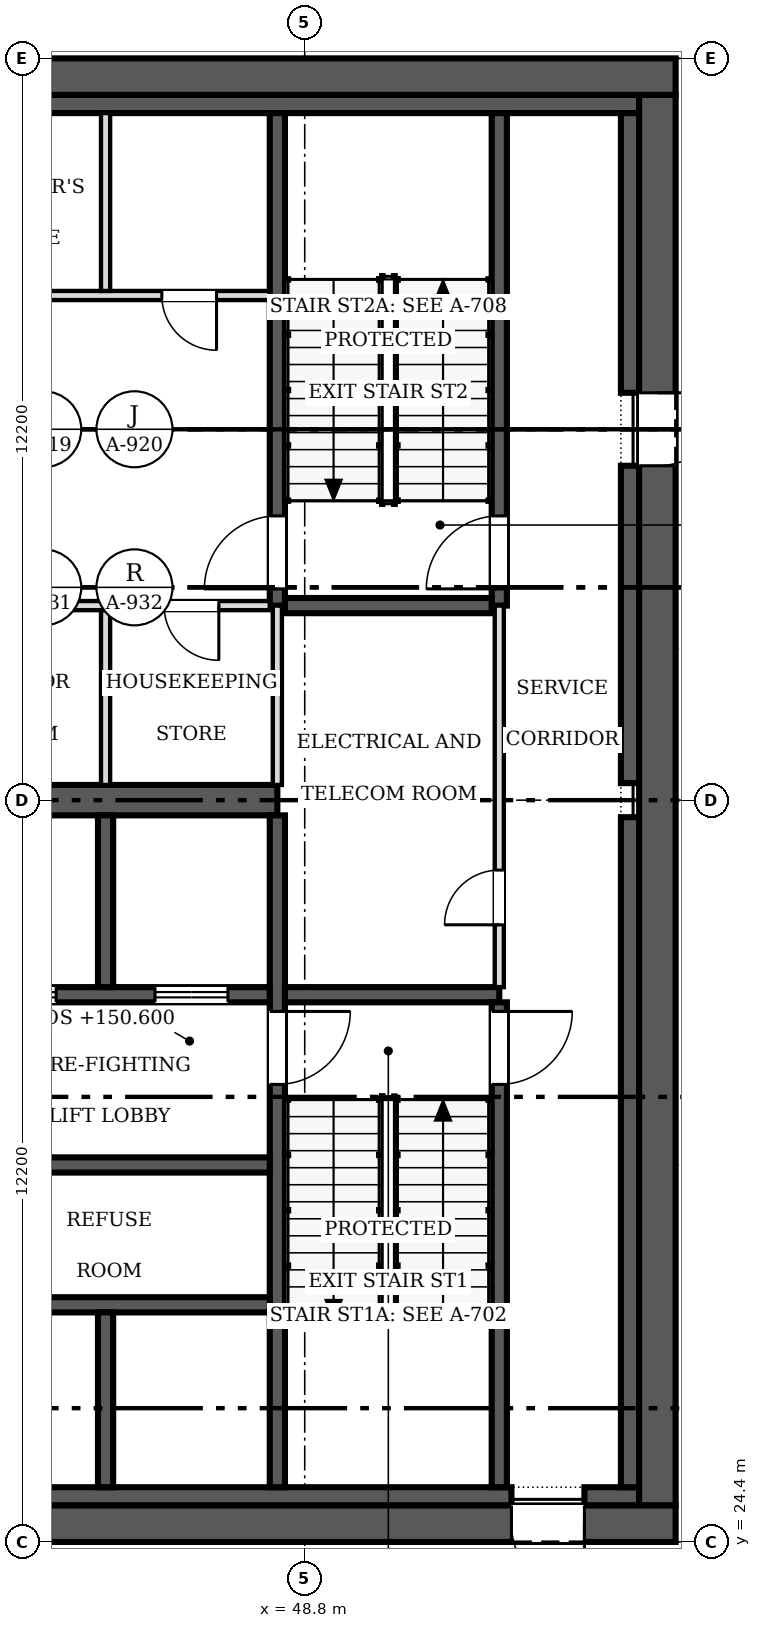
"""IFC4 building model, lengths in metres.
Left out: names, types, materials, properties, quantities, classifications, styles, units other than length and angle.
Written with IfcOpenShell. Run it as: python <this file> out.ifc"""

import sys

from ifc_helpers import new_model, si_unit, direction, frame, frame_2d, origin, place, context, subcontext, project, spatial, rectangle, extrude, source, transform, mapped, element, fill, save


model = new_model("IFC4")
c1 = context("Model", 3, precision=1e-05, world=origin(), true_north=direction((0.0, 1.0)))
c2 = subcontext(c1, "Body", "Model", "MODEL_VIEW")
j1 = project(units=[si_unit("LENGTHUNIT", "METRE"), si_unit("PLANEANGLEUNIT", "RADIAN")], contexts=[c1])
p1 = place(None, origin())
s1 = spatial("IfcSite", under=j1, at=p1, CompositionType="ELEMENT")
p2 = place(p1, origin())
s2 = spatial("IfcBuilding", under=s1, at=p2, CompositionType="ELEMENT")
p3 = place(p2, frame((0.0, 0.0, 150.6)))
s3 = spatial("IfcBuildingStorey", under=s2, at=p3, CompositionType="ELEMENT", Elevation=150.6)
p4 = place(p3, frame((54.9, 24.7, 0.0), z_axis=(0.0, 0.0, 1.0), x_axis=(-1.0, 0.0, 0.0)))
e1 = element("IfcWall", 1, at=p4, inside=s3, PredefinedType="SHEAR", context=c2, shape_type="SweptSolid", body=[
    extrude(rectangle(XDim=24.4, YDim=0.6, at=frame_2d((12.2, 0.0))), origin(), (0.0, 0.0, 1.0), 4.8),
])
m1 = source(origin(), c2, "Body", "SweptSolid", [
    extrude(rectangle(XDim=1.2, YDim=2.1, at=frame_2d((0.6, 1.05))), frame((0.0, 0.31, 0.0), z_axis=(0.0, -1.0, 0.0), x_axis=(1.0, 0.0, 0.0)), (0.0, 0.0, 1.0), 0.62),
])
p5 = place(p4, frame((1.5, 0.0, 0.0)))
e2 = element("IfcOpeningElement", 2, at=p5, cuts=e1, PredefinedType="OPENING", context=c2, shape_type="MappedRepresentation", body=[
    mapped(m1, transform((0.0, 0.0, 0.0), scale=1.0)),
])
p6 = place(p3, frame((30.5, 48.5, 0.0), z_axis=(0.0, 0.0, 1.0), x_axis=(1.0, 0.0, 0.0)))
e3 = element("IfcWall", 3, at=p6, inside=s3, PredefinedType="SHEAR", context=c2, shape_type="SweptSolid", body=[
    extrude(rectangle(XDim=24.4, YDim=0.6, at=frame_2d((12.2, 0.0))), origin(), (0.0, 0.0, 1.0), 4.8),
])
p7 = place(p3, frame((54.6, 48.2, 0.0), z_axis=(0.0, 0.0, 1.0), x_axis=(0.0, -1.0, 0.0)))
e4 = element("IfcWall", 4, at=p7, inside=s3, PredefinedType="SHEAR", context=c2, shape_type="SweptSolid", body=[
    extrude(rectangle(XDim=23.2, YDim=0.6, at=frame_2d((11.6, 0.0))), origin(), (0.0, 0.0, 1.0), 4.8),
])
p8 = place(p7, frame((4.9, 0.0, 0.0)))
e5 = element("IfcOpeningElement", 5, at=p8, cuts=e4, PredefinedType="OPENING", context=c2, shape_type="MappedRepresentation", body=[
    mapped(m1, transform((0.0, 0.0, 0.0), scale=1.0)),
])
p9 = place(p3, frame((31.1, 25.15, 0.0), z_axis=(0.0, 0.0, 1.0), x_axis=(1.0, 0.0, 0.0)))
e6 = element("IfcWall", 6, at=p9, inside=s3, PredefinedType="SOLIDWALL", context=c2, shape_type="SweptSolid", body=[
    extrude(rectangle(XDim=21.1, YDim=0.3, at=frame_2d((10.55, 0.0))), origin(), (0.0, 0.0, 1.0), 4.8),
])
p10 = place(p3, frame((53.4, 25.15, 0.0), z_axis=(0.0, 0.0, 1.0), x_axis=(1.0, 0.0, 0.0)))
e7 = element("IfcWall", 7, at=p10, inside=s3, PredefinedType="SOLIDWALL", context=c2, shape_type="SweptSolid", body=[
    extrude(rectangle(XDim=0.9, YDim=0.3, at=frame_2d((0.45, 0.0))), origin(), (0.0, 0.0, 1.0), 4.8),
])
p11 = place(p3, frame((31.1, 48.05, 0.0), z_axis=(0.0, 0.0, 1.0), x_axis=(1.0, 0.0, 0.0)))
e8 = element("IfcWall", 8, at=p11, inside=s3, PredefinedType="SOLIDWALL", context=c2, shape_type="SweptSolid", body=[
    extrude(rectangle(XDim=23.2, YDim=0.3, at=frame_2d((11.6, 0.0))), origin(), (0.0, 0.0, 1.0), 4.8),
])
p12 = place(p3, frame((54.15, 25.3, 0.0), z_axis=(0.0, 0.0, 1.0), x_axis=(0.0, 1.0, 0.0)))
e9 = element("IfcWall", 9, at=p12, inside=s3, PredefinedType="SOLIDWALL", context=c2, shape_type="SweptSolid", body=[
    extrude(rectangle(XDim=11.02, YDim=0.3, at=frame_2d((5.51, 0.0))), origin(), (0.0, 0.0, 1.0), 4.8),
])
p13 = place(p3, frame((54.15, 36.88, 0.0), z_axis=(0.0, 0.0, 1.0), x_axis=(0.0, 1.0, 0.0)))
e10 = element("IfcWall", 10, at=p13, inside=s3, PredefinedType="SOLIDWALL", context=c2, shape_type="SweptSolid", body=[
    extrude(rectangle(XDim=5.22, YDim=0.3, at=frame_2d((2.61, 0.0))), origin(), (0.0, 0.0, 1.0), 4.8),
])
p14 = place(p3, frame((54.15, 43.3, 0.0), z_axis=(0.0, 0.0, 1.0), x_axis=(0.0, 1.0, 0.0)))
e11 = element("IfcWall", 11, at=p14, inside=s3, PredefinedType="SOLIDWALL", context=c2, shape_type="SweptSolid", body=[
    extrude(rectangle(XDim=4.6, YDim=0.3, at=frame_2d((2.3, 0.0))), origin(), (0.0, 0.0, 1.0), 4.8),
])
p15 = place(p3, frame((31.4, 36.6, 0.0), z_axis=(0.0, 0.0, 1.0), x_axis=(1.0, 0.0, 0.0)))
e12 = element("IfcWall", 12, at=p15, inside=s3, PredefinedType="SHEAR", context=c2, shape_type="SweptSolid", body=[
    extrude(rectangle(XDim=16.95, YDim=0.5, at=frame_2d((8.475, 0.0))), origin(), (0.0, 0.0, 1.0), 4.8),
])
p16 = place(p3, frame((48.35, 36.35, 0.0), z_axis=(0.0, 0.0, 1.0), x_axis=(0.0, -1.0, 0.0)))
e13 = element("IfcWall", 13, at=p16, inside=s3, PredefinedType="SOLIDWALL", context=c2, shape_type="SweptSolid", body=[
    extrude(rectangle(XDim=11.05, YDim=0.25, at=frame_2d((5.525, 0.0))), origin(), (0.0, 0.0, 1.0), 4.8),
])
m2 = source(origin(), c2, "Body", "SweptSolid", [
    extrude(rectangle(XDim=1.2, YDim=2.1, at=frame_2d((0.6, 1.05))), frame((0.0, 0.135, 0.0), z_axis=(0.0, -1.0, 0.0), x_axis=(1.0, 0.0, 0.0)), (0.0, 0.0, 1.0), 0.27),
])
p17 = place(p16, frame((3.225, 0.0, 0.0)))
e14 = element("IfcOpeningElement", 14, at=p17, cuts=e13, PredefinedType="OPENING", context=c2, shape_type="MappedRepresentation", body=[
    mapped(m2, transform((0.0, 0.0, 0.0), scale=1.0)),
])
p18 = place(p3, frame((48.225, 33.4, 0.0), z_axis=(0.0, 0.0, 1.0), x_axis=(-1.0, 0.0, 0.0)))
e15 = element("IfcWall", 15, at=p18, inside=s3, PredefinedType="SOLIDWALL", context=c2, shape_type="SweptSolid", body=[
    extrude(rectangle(XDim=5.275, YDim=0.25, at=frame_2d((2.638, 0.0))), origin(), (0.0, 0.0, 1.0), 4.8),
])
p19 = place(p18, frame((3.512, 0.0, 0.0)))
e16 = element("IfcOpeningElement", 16, at=p19, cuts=e15, PredefinedType="OPENING", context=c2, shape_type="MappedRepresentation", body=[
    mapped(m2, transform((0.0, 0.0, 0.0), scale=1.0)),
])
p20 = place(p18, frame((0.688, 0.0, 0.0)))
e17 = element("IfcOpeningElement", 17, at=p20, cuts=e15, PredefinedType="OPENING", context=c2, shape_type="MappedRepresentation", body=[
    mapped(m2, transform((0.0, 0.0, 0.0), scale=1.0)),
])
p21 = place(p3, frame((48.475, 33.4, 0.0), z_axis=(0.0, 0.0, 1.0), x_axis=(1.0, 0.0, 0.0)))
e18 = element("IfcWall", 18, at=p21, inside=s3, PredefinedType="SOLIDWALL", context=c2, shape_type="SweptSolid", body=[
    extrude(rectangle(XDim=3.525, YDim=0.25, at=frame_2d((1.762, 0.0))), origin(), (0.0, 0.0, 1.0), 4.8),
])
p22 = place(p3, frame((48.35, 47.9, 0.0), z_axis=(0.0, 0.0, 1.0), x_axis=(0.0, -1.0, 0.0)))
e19 = element("IfcWall", 19, at=p22, inside=s3, PredefinedType="SOLIDWALL", context=c2, shape_type="SweptSolid", body=[
    extrude(rectangle(XDim=8.1, YDim=0.25, at=frame_2d((4.05, 0.0))), origin(), (0.0, 0.0, 1.0), 4.8),
])
p23 = place(p22, frame((6.625, 0.0, 0.0)))
e20 = element("IfcOpeningElement", 20, at=p23, cuts=e19, PredefinedType="OPENING", context=c2, shape_type="MappedRepresentation", body=[
    mapped(m2, transform((0.0, 0.0, 0.0), scale=1.0)),
])
p24 = place(p3, frame((52.0, 25.3, 0.0), z_axis=(0.0, 0.0, 1.0), x_axis=(0.0, 1.0, 0.0)))
e21 = element("IfcWall", 21, at=p24, inside=s3, PredefinedType="SOLIDWALL", context=c2, shape_type="SweptSolid", body=[
    extrude(rectangle(XDim=7.975, YDim=0.25, at=frame_2d((3.987, 0.0))), origin(), (0.0, 0.0, 1.0), 4.8),
])
p25 = place(p24, frame((6.625, 0.0, 0.0)))
e22 = element("IfcOpeningElement", 22, at=p25, cuts=e21, PredefinedType="OPENING", context=c2, shape_type="MappedRepresentation", body=[
    mapped(m2, transform((0.0, 0.0, 0.0), scale=1.0)),
])
p26 = place(p3, frame((52.0, 39.8, 0.0), z_axis=(0.0, 0.0, 1.0), x_axis=(0.0, 1.0, 0.0)))
e23 = element("IfcWall", 23, at=p26, inside=s3, PredefinedType="SOLIDWALL", context=c2, shape_type="SweptSolid", body=[
    extrude(rectangle(XDim=8.1, YDim=0.25, at=frame_2d((4.05, 0.0))), origin(), (0.0, 0.0, 1.0), 4.8),
])
p27 = place(p26, frame((0.275, 0.0, 0.0)))
e24 = element("IfcOpeningElement", 24, at=p27, cuts=e23, PredefinedType="OPENING", context=c2, shape_type="MappedRepresentation", body=[
    mapped(m2, transform((0.0, 0.0, 0.0), scale=1.0)),
])
for number, where, z_axis, x_axis in (
    (25, (42.95, 28.3, 0.0), (0.0, 0.0, 1.0), (1.0, 0.0, 0.0)),
    (26, (42.95, 30.6, 0.0), (0.0, 0.0, 1.0), (1.0, 0.0, 0.0)),
):
    element("IfcWall", number, at=place(p3, frame(where, z_axis=z_axis, x_axis=x_axis)), inside=s3, PredefinedType="SOLIDWALL", context=c2, shape_type="SweptSolid", body=[
        extrude(rectangle(XDim=5.275, YDim=0.25, at=frame_2d((2.638, 0.0))), origin(), (0.0, 0.0, 1.0), 4.8),
    ])
p28 = place(p3, frame((48.475, 39.8, 0.0), z_axis=(0.0, 0.0, 1.0), x_axis=(1.0, 0.0, 0.0)))
e27 = element("IfcWall", 27, at=p28, inside=s3, PredefinedType="SOLIDWALL", context=c2, shape_type="SweptSolid", body=[
    extrude(rectangle(XDim=3.4, YDim=0.25, at=frame_2d((1.7, 0.0))), origin(), (0.0, 0.0, 1.0), 4.8),
])
p29 = place(p3, frame((45.525, 33.525, 0.0), z_axis=(0.0, 0.0, 1.0), x_axis=(0.0, 1.0, 0.0)))
e28 = element("IfcWall", 28, at=p29, inside=s3, PredefinedType="SOLIDWALL", context=c2, shape_type="SweptSolid", body=[
    extrude(rectangle(XDim=2.825, YDim=0.25, at=frame_2d((1.413, 0.0))), origin(), (0.0, 0.0, 1.0), 4.8),
])
p30 = place(p3, frame((45.525, 25.3, 0.0), z_axis=(0.0, 0.0, 1.0), x_axis=(0.0, 1.0, 0.0)))
e29 = element("IfcWall", 29, at=p30, inside=s3, PredefinedType="SOLIDWALL", context=c2, shape_type="SweptSolid", body=[
    extrude(rectangle(XDim=2.875, YDim=0.25, at=frame_2d((1.438, 0.0))), origin(), (0.0, 0.0, 1.0), 4.8),
])
p31 = place(p3, frame((52.0, 33.525, 0.0), z_axis=(0.0, 0.0, 1.0), x_axis=(0.0, 1.0, 0.0)))
e30 = element("IfcWall", 30, at=p31, inside=s3, PredefinedType="PARTITIONING", context=c2, shape_type="SweptSolid", body=[
    extrude(rectangle(XDim=6.275, YDim=0.15, at=frame_2d((3.138, 0.0))), origin(), (0.0, 0.0, 1.0), 4.6),
])
m3 = source(origin(), c2, "Body", "SweptSolid", [
    extrude(rectangle(XDim=0.9, YDim=2.1, at=frame_2d((0.45, 1.05))), frame((0.0, 0.085, 0.0), z_axis=(0.0, -1.0, 0.0), x_axis=(1.0, 0.0, 0.0)), (0.0, 0.0, 1.0), 0.17),
])
p32 = place(p31, frame((1.025, 0.0, 0.0)))
e31 = element("IfcOpeningElement", 31, at=p32, cuts=e30, PredefinedType="OPENING", context=c2, shape_type="MappedRepresentation", body=[
    mapped(m3, transform((0.0, 0.0, 0.0), scale=1.0)),
])
p33 = place(p3, frame((48.225, 39.8, 0.0), z_axis=(0.0, 0.0, 1.0), x_axis=(-1.0, 0.0, 0.0)))
e32 = element("IfcWall", 32, at=p33, inside=s3, PredefinedType="PARTITIONING", context=c2, shape_type="SweptSolid", body=[
    extrude(rectangle(XDim=5.275, YDim=0.15, at=frame_2d((2.638, 0.0))), origin(), (0.0, 0.0, 1.0), 4.6),
])
p34 = place(p33, frame((3.663, 0.0, 0.0)))
e33 = element("IfcOpeningElement", 33, at=p34, cuts=e32, PredefinedType="OPENING", context=c2, shape_type="MappedRepresentation", body=[
    mapped(m3, transform((0.0, 0.0, 0.0), scale=1.0)),
])
p35 = place(p33, frame((0.837, 0.0, 0.0)))
e34 = element("IfcOpeningElement", 34, at=p35, cuts=e32, PredefinedType="OPENING", context=c2, shape_type="MappedRepresentation", body=[
    mapped(m3, transform((0.0, 0.0, 0.0), scale=1.0)),
])
p36 = place(p3, frame((42.95, 44.9, 0.0), z_axis=(0.0, 0.0, 1.0), x_axis=(1.0, 0.0, 0.0)))
e35 = element("IfcWall", 35, at=p36, inside=s3, PredefinedType="PARTITIONING", context=c2, shape_type="SweptSolid", body=[
    extrude(rectangle(XDim=5.275, YDim=0.15, at=frame_2d((2.638, 0.0))), origin(), (0.0, 0.0, 1.0), 4.6),
])
p37 = place(p36, frame((0.712, 0.0, 0.0)))
e36 = element("IfcOpeningElement", 36, at=p37, cuts=e35, PredefinedType="OPENING", context=c2, shape_type="MappedRepresentation", body=[
    mapped(m3, transform((0.0, 0.0, 0.0), scale=1.0)),
])
p38 = place(p36, frame((3.5, 0.0, 0.0)))
e37 = element("IfcOpeningElement", 37, at=p38, cuts=e35, PredefinedType="OPENING", context=c2, shape_type="MappedRepresentation", body=[
    mapped(m3, transform((0.0, 0.0, 0.0), scale=1.0)),
])
p39 = place(p3, frame((45.525, 36.85, 0.0), z_axis=(0.0, 0.0, 1.0), x_axis=(0.0, 1.0, 0.0)))
e38 = element("IfcWall", 38, at=p39, inside=s3, PredefinedType="PARTITIONING", context=c2, shape_type="SweptSolid", body=[
    extrude(rectangle(XDim=2.875, YDim=0.15, at=frame_2d((1.438, 0.0))), origin(), (0.0, 0.0, 1.0), 4.6),
])
p40 = place(p3, frame((48.35, 36.85, 0.0), z_axis=(0.0, 0.0, 1.0), x_axis=(0.0, 1.0, 0.0)))
e39 = element("IfcWall", 39, at=p40, inside=s3, PredefinedType="PARTITIONING", context=c2, shape_type="SweptSolid", body=[
    extrude(rectangle(XDim=2.95, YDim=0.15, at=frame_2d((1.475, 0.0))), origin(), (0.0, 0.0, 1.0), 4.6),
])
p41 = place(p3, frame((45.525, 44.975, 0.0), z_axis=(0.0, 0.0, 1.0), x_axis=(0.0, 1.0, 0.0)))
e40 = element("IfcWall", 40, at=p41, inside=s3, PredefinedType="PARTITIONING", context=c2, shape_type="SweptSolid", body=[
    extrude(rectangle(XDim=2.925, YDim=0.15, at=frame_2d((1.462, 0.0))), origin(), (0.0, 0.0, 1.0), 4.6),
])
m4 = source(origin(), c2, "Body", "SweptSolid", [
    extrude(rectangle(XDim=1.2, YDim=2.1, at=frame_2d((0.6, 1.05))), frame((0.0, 0.025, 0.0), z_axis=(0.0, -1.0, 0.0), x_axis=(1.0, 0.0, 0.0)), (0.0, 0.0, 1.0), 0.05),
])
p42 = place(p5, origin())
e41 = element("IfcDoor", 41, at=p42, inside=s3, OperationType="SINGLE_SWING_LEFT", PredefinedType="DOOR", context=c2, shape_type="MappedRepresentation", body=[
    mapped(m4, transform((0.0, 0.0, 0.0), scale=1.0)),
])
fill(e2, e41)
p43 = place(p8, origin())
e42 = element("IfcDoor", 42, at=p43, inside=s3, OperationType="SINGLE_SWING_LEFT", PredefinedType="DOOR", context=c2, shape_type="MappedRepresentation", body=[
    mapped(m4, transform((0.0, 0.0, 0.0), scale=1.0)),
])
fill(e5, e42)
p44 = place(p17, origin())
e43 = element("IfcDoor", 43, at=p44, inside=s3, OperationType="SINGLE_SWING_LEFT", PredefinedType="DOOR", context=c2, shape_type="MappedRepresentation", body=[
    mapped(m4, transform((0.0, 0.0, 0.0), scale=1.0)),
])
fill(e14, e43)
p45 = place(p19, origin())
e44 = element("IfcDoor", 44, at=p45, inside=s3, OperationType="DOUBLE_DOOR_SLIDING", PredefinedType="DOOR", context=c2, shape_type="MappedRepresentation", body=[
    mapped(m4, transform((0.0, 0.0, 0.0), scale=1.0)),
])
fill(e16, e44)
p46 = place(p20, origin())
e45 = element("IfcDoor", 45, at=p46, inside=s3, OperationType="DOUBLE_DOOR_SLIDING", PredefinedType="DOOR", context=c2, shape_type="MappedRepresentation", body=[
    mapped(m4, transform((0.0, 0.0, 0.0), scale=1.0)),
])
fill(e17, e45)
p47 = place(p23, origin())
e46 = element("IfcDoor", 46, at=p47, inside=s3, OperationType="SINGLE_SWING_RIGHT", PredefinedType="DOOR", context=c2, shape_type="MappedRepresentation", body=[
    mapped(m4, transform((0.0, 0.0, 0.0), scale=1.0)),
])
fill(e20, e46)
p48 = place(p25, origin())
e47 = element("IfcDoor", 47, at=p48, inside=s3, OperationType="SINGLE_SWING_RIGHT", PredefinedType="DOOR", context=c2, shape_type="MappedRepresentation", body=[
    mapped(m4, transform((0.0, 0.0, 0.0), scale=1.0)),
])
fill(e22, e47)
p49 = place(p27, origin())
e48 = element("IfcDoor", 48, at=p49, inside=s3, OperationType="SINGLE_SWING_LEFT", PredefinedType="DOOR", context=c2, shape_type="MappedRepresentation", body=[
    mapped(m4, transform((0.0, 0.0, 0.0), scale=1.0)),
])
fill(e24, e48)
m5 = source(origin(), c2, "Body", "SweptSolid", [
    extrude(rectangle(XDim=0.9, YDim=2.1, at=frame_2d((0.45, 1.05))), frame((0.0, 0.025, 0.0), z_axis=(0.0, -1.0, 0.0), x_axis=(1.0, 0.0, 0.0)), (0.0, 0.0, 1.0), 0.05),
])
p50 = place(p32, origin())
e49 = element("IfcDoor", 49, at=p50, inside=s3, OperationType="SINGLE_SWING_LEFT", PredefinedType="DOOR", context=c2, shape_type="MappedRepresentation", body=[
    mapped(m5, transform((0.0, 0.0, 0.0), scale=1.0)),
])
fill(e31, e49)
p51 = place(p35, origin())
e50 = element("IfcDoor", 50, at=p51, inside=s3, OperationType="SINGLE_SWING_LEFT", PredefinedType="DOOR", context=c2, shape_type="MappedRepresentation", body=[
    mapped(m5, transform((0.0, 0.0, 0.0), scale=1.0)),
])
fill(e34, e50)
p52 = place(p38, origin())
e51 = element("IfcDoor", 51, at=p52, inside=s3, OperationType="SINGLE_SWING_RIGHT", PredefinedType="DOOR", context=c2, shape_type="MappedRepresentation", body=[
    mapped(m5, transform((0.0, 0.0, 0.0), scale=1.0)),
])
fill(e37, e51)
save(model, sys.argv[1])
